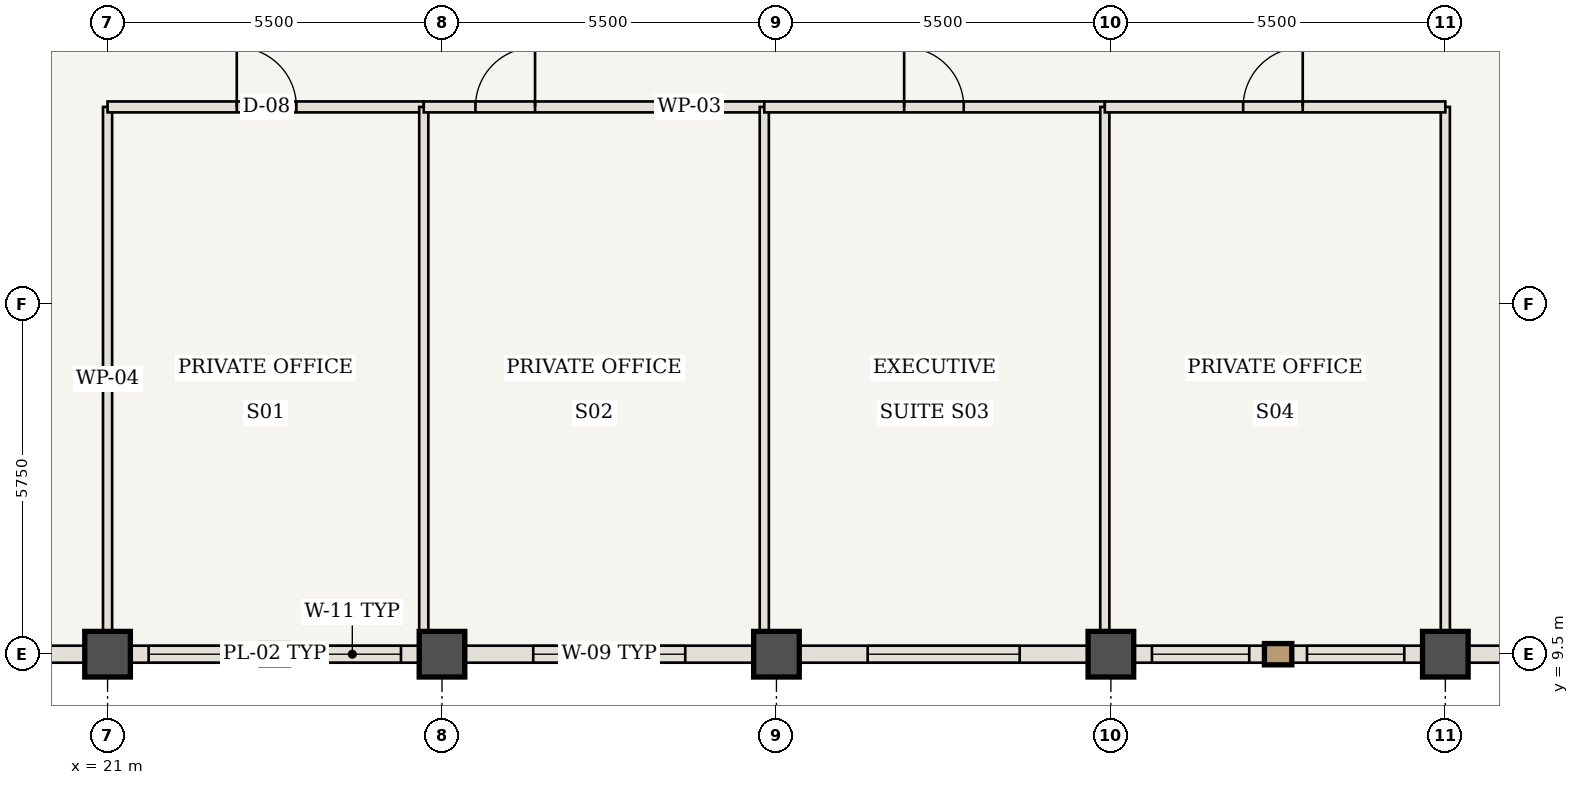
"""IFC4 building model, lengths in metres.
Left out: names, types, materials, properties, quantities, classifications, styles, units other than length and angle.
Written with IfcOpenShell. Run it as: python <this file> out.ifc"""

import sys

from ifc_helpers import new_model, si_unit, direction, frame, frame_2d, origin, origin_2d, place, context, subcontext, project, spatial, rectangle, extrude, element, fill, save


model = new_model("IFC4")
c1 = context("Model", 3, precision=1e-05, world=origin(), true_north=direction((0.0, 1.0)))
c2 = subcontext(c1, "Body", "Model", "MODEL_VIEW")
j1 = project(units=[si_unit("LENGTHUNIT", "METRE"), si_unit("PLANEANGLEUNIT", "RADIAN")], contexts=[c1])
p1 = place(None, origin())
s1 = spatial("IfcSite", under=j1, at=p1, CompositionType="ELEMENT")
p2 = place(p1, origin())
s2 = spatial("IfcBuilding", under=s1, at=p2, CompositionType="ELEMENT")
p3 = place(p2, frame((0.0, 0.0, 269.85)))
s3 = spatial("IfcBuildingStorey", under=s2, at=p3, CompositionType="ELEMENT", Elevation=269.85)
for number, where, z_axis, x_axis in (
    (1, (21.0, 9.5, 0.0), (0.0, 0.0, 1.0), (1.0, 0.0, 0.0)),
    (2, (26.5, 9.5, 0.0), (0.0, 0.0, 1.0), (1.0, 0.0, 0.0)),
    (3, (32.0, 9.5, 0.0), (0.0, 0.0, 1.0), (1.0, 0.0, 0.0)),
    (4, (37.5, 9.5, 0.0), (0.0, 0.0, 1.0), (1.0, 0.0, 0.0)),
    (5, (43.0, 9.5, 0.0), (0.0, 0.0, 1.0), (1.0, 0.0, 0.0)),
):
    element("IfcColumn", number, at=place(p3, frame(where, z_axis=z_axis, x_axis=x_axis)), inside=s3, PredefinedType="COLUMN", context=c2, shape_type="SweptSolid", body=[
        extrude(rectangle(XDim=0.75, YDim=0.75, at=origin_2d()), origin(), (0.0, 0.0, 1.0), 3.85),
    ])
for number, where, z_axis, x_axis in (
    (6, (21.0, 9.56, 0.0), (0.0, 0.0, 1.0), (0.0, 1.0, 0.0)),
    (7, (43.0, 9.56, 0.0), (0.0, 0.0, 1.0), (0.0, 1.0, 0.0)),
):
    element("IfcWall", number, at=place(p3, frame(where, z_axis=z_axis, x_axis=x_axis)), inside=s3, PredefinedType="STANDARD", context=c2, shape_type="SweptSolid", body=[
        extrude(rectangle(XDim=8.94, YDim=0.15, at=frame_2d((4.47, 0.0))), origin(), (0.0, 0.0, 1.0), 3.685),
    ])
p4 = place(p3, frame((21.0, 18.5, 0.0), z_axis=(0.0, 0.0, 1.0), x_axis=(1.0, 0.0, 0.0)))
e8 = element("IfcWall", 8, at=p4, inside=s3, PredefinedType="STANDARD", context=c2, shape_type="SweptSolid", body=[
    extrude(rectangle(XDim=5.2, YDim=0.18, at=frame_2d((2.6, 0.0))), origin(), (0.0, 0.0, 1.0), 3.685),
])
p5 = place(p4, frame((2.125, 0.0, 0.0)))
e9 = element("IfcOpeningElement", 9, at=p5, cuts=e8, PredefinedType="OPENING", context=c2, shape_type="SweptSolid", body=[
    extrude(rectangle(XDim=0.98, YDim=2.2, at=frame_2d((0.49, 1.1))), frame((0.0, 0.1, 0.0), z_axis=(0.0, -1.0, 0.0), x_axis=(1.0, 0.0, 0.0)), (0.0, 0.0, 1.0), 0.2),
])
p6 = place(p3, frame((26.2, 9.56, 0.0), z_axis=(0.0, 0.0, 1.0), x_axis=(0.0, 1.0, 0.0)))
e10 = element("IfcWall", 10, at=p6, inside=s3, PredefinedType="STANDARD", context=c2, shape_type="SweptSolid", body=[
    extrude(rectangle(XDim=8.94, YDim=0.15, at=frame_2d((4.47, 0.0))), origin(), (0.0, 0.0, 1.0), 3.685),
])
p7 = place(p3, frame((26.2, 18.5, 0.0), z_axis=(0.0, 0.0, 1.0), x_axis=(1.0, 0.0, 0.0)))
e11 = element("IfcWall", 11, at=p7, inside=s3, PredefinedType="STANDARD", context=c2, shape_type="SweptSolid", body=[
    extrude(rectangle(XDim=5.6, YDim=0.18, at=frame_2d((2.8, 0.0))), origin(), (0.0, 0.0, 1.0), 3.685),
])
p8 = place(p7, frame((0.85, 0.0, 0.0)))
e12 = element("IfcOpeningElement", 12, at=p8, cuts=e11, PredefinedType="OPENING", context=c2, shape_type="SweptSolid", body=[
    extrude(rectangle(XDim=0.98, YDim=2.2, at=frame_2d((0.49, 1.1))), frame((0.0, 0.1, 0.0), z_axis=(0.0, -1.0, 0.0), x_axis=(1.0, 0.0, 0.0)), (0.0, 0.0, 1.0), 0.2),
])
p9 = place(p3, frame((31.8, 9.56, 0.0), z_axis=(0.0, 0.0, 1.0), x_axis=(0.0, 1.0, 0.0)))
e13 = element("IfcWall", 13, at=p9, inside=s3, PredefinedType="STANDARD", context=c2, shape_type="SweptSolid", body=[
    extrude(rectangle(XDim=8.94, YDim=0.15, at=frame_2d((4.47, 0.0))), origin(), (0.0, 0.0, 1.0), 3.14),
])
p10 = place(p3, frame((31.8, 18.5, 0.0), z_axis=(0.0, 0.0, 1.0), x_axis=(1.0, 0.0, 0.0)))
e14 = element("IfcWall", 14, at=p10, inside=s3, PredefinedType="STANDARD", context=c2, shape_type="SweptSolid", body=[
    extrude(rectangle(XDim=5.6, YDim=0.18, at=frame_2d((2.8, 0.0))), origin(), (0.0, 0.0, 1.0), 3.685),
])
p11 = place(p10, frame((2.3, 0.0, 0.0)))
e15 = element("IfcOpeningElement", 15, at=p11, cuts=e14, PredefinedType="OPENING", context=c2, shape_type="SweptSolid", body=[
    extrude(rectangle(XDim=0.98, YDim=2.2, at=frame_2d((0.49, 1.1))), frame((0.0, 0.1, 0.0), z_axis=(0.0, -1.0, 0.0), x_axis=(1.0, 0.0, 0.0)), (0.0, 0.0, 1.0), 0.2),
])
p12 = place(p3, frame((37.4, 9.56, 0.0), z_axis=(0.0, 0.0, 1.0), x_axis=(0.0, 1.0, 0.0)))
e16 = element("IfcWall", 16, at=p12, inside=s3, PredefinedType="STANDARD", context=c2, shape_type="SweptSolid", body=[
    extrude(rectangle(XDim=8.94, YDim=0.15, at=frame_2d((4.47, 0.0))), origin(), (0.0, 0.0, 1.0), 3.685),
])
p13 = place(p3, frame((37.4, 18.5, 0.0), z_axis=(0.0, 0.0, 1.0), x_axis=(1.0, 0.0, 0.0)))
e17 = element("IfcWall", 17, at=p13, inside=s3, PredefinedType="STANDARD", context=c2, shape_type="SweptSolid", body=[
    extrude(rectangle(XDim=5.6, YDim=0.18, at=frame_2d((2.8, 0.0))), origin(), (0.0, 0.0, 1.0), 3.685),
])
p14 = place(p13, frame((2.275, 0.0, 0.0)))
e18 = element("IfcOpeningElement", 18, at=p14, cuts=e17, PredefinedType="OPENING", context=c2, shape_type="SweptSolid", body=[
    extrude(rectangle(XDim=0.98, YDim=2.2, at=frame_2d((0.49, 1.1))), frame((0.0, 0.1, 0.0), z_axis=(0.0, -1.0, 0.0), x_axis=(1.0, 0.0, 0.0)), (0.0, 0.0, 1.0), 0.2),
])
p15 = place(p3, frame((21.0, 9.5, 0.0), z_axis=(0.0, 0.0, 1.0), x_axis=(-1.0, 0.0, 0.0)))
e19 = element("IfcWall", 19, at=p15, inside=s3, PredefinedType="USERDEFINED", context=c2, shape_type="SweptSolid", body=[
    extrude(rectangle(XDim=5.5, YDim=0.28, at=frame_2d((2.75, 0.0))), origin(), (0.0, 0.0, 1.0), 2.985),
])
p16 = place(p3, frame((26.5, 9.5, 0.0), z_axis=(0.0, 0.0, 1.0), x_axis=(-1.0, 0.0, 0.0)))
e20 = element("IfcWall", 20, at=p16, inside=s3, PredefinedType="USERDEFINED", context=c2, shape_type="SweptSolid", body=[
    extrude(rectangle(XDim=5.5, YDim=0.28, at=frame_2d((2.75, 0.0))), origin(), (0.0, 0.0, 1.0), 2.985),
])
p17 = place(p16, frame((0.675, 0.0, 0.85)))
e21 = element("IfcOpeningElement", 21, at=p17, cuts=e20, PredefinedType="OPENING", context=c2, shape_type="SweptSolid", body=[
    extrude(rectangle(XDim=1.6, YDim=1.935, at=frame_2d((0.8, 0.968))), frame((0.0, 0.15, 0.0), z_axis=(0.0, -1.0, 0.0), x_axis=(1.0, 0.0, 0.0)), (0.0, 0.0, 1.0), 0.3),
])
p18 = place(p16, frame((3.225, 0.0, 0.85)))
e22 = element("IfcOpeningElement", 22, at=p18, cuts=e20, PredefinedType="OPENING", context=c2, shape_type="SweptSolid", body=[
    extrude(rectangle(XDim=1.6, YDim=1.935, at=frame_2d((0.8, 0.968))), frame((0.0, 0.15, 0.0), z_axis=(0.0, -1.0, 0.0), x_axis=(1.0, 0.0, 0.0)), (0.0, 0.0, 1.0), 0.3),
])
p19 = place(p3, frame((32.0, 9.5, 0.0), z_axis=(0.0, 0.0, 1.0), x_axis=(-1.0, 0.0, 0.0)))
e23 = element("IfcWall", 23, at=p19, inside=s3, PredefinedType="USERDEFINED", context=c2, shape_type="SweptSolid", body=[
    extrude(rectangle(XDim=5.5, YDim=0.28, at=frame_2d((2.75, 0.0))), origin(), (0.0, 0.0, 1.0), 2.985),
])
p20 = place(p19, frame((1.5, 0.0, 0.85)))
e24 = element("IfcOpeningElement", 24, at=p20, cuts=e23, PredefinedType="OPENING", context=c2, shape_type="SweptSolid", body=[
    extrude(rectangle(XDim=2.5, YDim=1.935, at=frame_2d((1.25, 0.968))), frame((0.0, 0.15, 0.0), z_axis=(0.0, -1.0, 0.0), x_axis=(1.0, 0.0, 0.0)), (0.0, 0.0, 1.0), 0.3),
])
p21 = place(p3, frame((37.5, 9.5, 0.0), z_axis=(0.0, 0.0, 1.0), x_axis=(-1.0, 0.0, 0.0)))
e25 = element("IfcWall", 25, at=p21, inside=s3, PredefinedType="USERDEFINED", context=c2, shape_type="SweptSolid", body=[
    extrude(rectangle(XDim=5.5, YDim=0.28, at=frame_2d((2.75, 0.0))), origin(), (0.0, 0.0, 1.0), 2.985),
])
p22 = place(p21, frame((1.5, 0.0, 0.85)))
e26 = element("IfcOpeningElement", 26, at=p22, cuts=e25, PredefinedType="OPENING", context=c2, shape_type="SweptSolid", body=[
    extrude(rectangle(XDim=2.5, YDim=1.935, at=frame_2d((1.25, 0.968))), frame((0.0, 0.15, 0.0), z_axis=(0.0, -1.0, 0.0), x_axis=(1.0, 0.0, 0.0)), (0.0, 0.0, 1.0), 0.3),
])
p23 = place(p3, frame((43.0, 9.5, 0.0), z_axis=(0.0, 0.0, 1.0), x_axis=(-1.0, 0.0, 0.0)))
e27 = element("IfcWall", 27, at=p23, inside=s3, PredefinedType="USERDEFINED", context=c2, shape_type="SweptSolid", body=[
    extrude(rectangle(XDim=5.5, YDim=0.28, at=frame_2d((2.75, 0.0))), origin(), (0.0, 0.0, 1.0), 2.985),
])
p24 = place(p23, frame((0.675, 0.0, 0.85)))
e28 = element("IfcOpeningElement", 28, at=p24, cuts=e27, PredefinedType="OPENING", context=c2, shape_type="SweptSolid", body=[
    extrude(rectangle(XDim=1.6, YDim=1.935, at=frame_2d((0.8, 0.968))), frame((0.0, 0.15, 0.0), z_axis=(0.0, -1.0, 0.0), x_axis=(1.0, 0.0, 0.0)), (0.0, 0.0, 1.0), 0.3),
])
p25 = place(p23, frame((3.225, 0.0, 0.85)))
e29 = element("IfcOpeningElement", 29, at=p25, cuts=e27, PredefinedType="OPENING", context=c2, shape_type="SweptSolid", body=[
    extrude(rectangle(XDim=1.6, YDim=1.935, at=frame_2d((0.8, 0.968))), frame((0.0, 0.15, 0.0), z_axis=(0.0, -1.0, 0.0), x_axis=(1.0, 0.0, 0.0)), (0.0, 0.0, 1.0), 0.3),
])
p26 = place(p3, frame((48.5, 9.5, 0.0), z_axis=(0.0, 0.0, 1.0), x_axis=(-1.0, 0.0, 0.0)))
e30 = element("IfcWall", 30, at=p26, inside=s3, PredefinedType="USERDEFINED", context=c2, shape_type="SweptSolid", body=[
    extrude(rectangle(XDim=5.5, YDim=0.28, at=frame_2d((2.75, 0.0))), origin(), (0.0, 0.0, 1.0), 2.985),
])
p27 = place(p5, origin())
e31 = element("IfcDoor", 31, at=p27, inside=s3, OperationType="SINGLE_SWING_LEFT", PredefinedType="DOOR", context=c2, shape_type="SweptSolid", body=[
    extrude(rectangle(XDim=0.98, YDim=2.2, at=frame_2d((0.49, 1.1))), frame((0.0, 0.025, 0.0), z_axis=(0.0, -1.0, 0.0), x_axis=(1.0, 0.0, 0.0)), (0.0, 0.0, 1.0), 0.05),
])
fill(e9, e31)
p28 = place(p8, origin())
e32 = element("IfcDoor", 32, at=p28, inside=s3, OperationType="SINGLE_SWING_RIGHT", PredefinedType="DOOR", context=c2, shape_type="SweptSolid", body=[
    extrude(rectangle(XDim=0.98, YDim=2.2, at=frame_2d((0.49, 1.1))), frame((0.0, 0.025, 0.0), z_axis=(0.0, -1.0, 0.0), x_axis=(1.0, 0.0, 0.0)), (0.0, 0.0, 1.0), 0.05),
])
fill(e12, e32)
p29 = place(p11, origin())
e33 = element("IfcDoor", 33, at=p29, inside=s3, OperationType="SINGLE_SWING_LEFT", PredefinedType="DOOR", context=c2, shape_type="SweptSolid", body=[
    extrude(rectangle(XDim=0.98, YDim=2.2, at=frame_2d((0.49, 1.1))), frame((0.0, 0.025, 0.0), z_axis=(0.0, -1.0, 0.0), x_axis=(1.0, 0.0, 0.0)), (0.0, 0.0, 1.0), 0.05),
])
fill(e15, e33)
p30 = place(p14, origin())
e34 = element("IfcDoor", 34, at=p30, inside=s3, OperationType="SINGLE_SWING_RIGHT", PredefinedType="DOOR", context=c2, shape_type="SweptSolid", body=[
    extrude(rectangle(XDim=0.98, YDim=2.2, at=frame_2d((0.49, 1.1))), frame((0.0, 0.025, 0.0), z_axis=(0.0, -1.0, 0.0), x_axis=(1.0, 0.0, 0.0)), (0.0, 0.0, 1.0), 0.05),
])
fill(e18, e34)
p31 = place(p17, origin())
e35 = element("IfcWindow", 35, at=p31, inside=s3, PartitioningType="SINGLE_PANEL", PredefinedType="WINDOW", context=c2, shape_type="SweptSolid", body=[
    extrude(rectangle(XDim=1.6, YDim=1.935, at=frame_2d((0.8, 0.968))), frame((0.0, 0.03, 0.0), z_axis=(0.0, -1.0, 0.0), x_axis=(1.0, 0.0, 0.0)), (0.0, 0.0, 1.0), 0.06),
])
fill(e21, e35)
p32 = place(p18, origin())
e36 = element("IfcWindow", 36, at=p32, inside=s3, PartitioningType="SINGLE_PANEL", PredefinedType="WINDOW", context=c2, shape_type="SweptSolid", body=[
    extrude(rectangle(XDim=1.6, YDim=1.935, at=frame_2d((0.8, 0.968))), frame((0.0, 0.03, 0.0), z_axis=(0.0, -1.0, 0.0), x_axis=(1.0, 0.0, 0.0)), (0.0, 0.0, 1.0), 0.06),
])
fill(e22, e36)
p33 = place(p20, origin())
e37 = element("IfcWindow", 37, at=p33, inside=s3, PartitioningType="SINGLE_PANEL", PredefinedType="WINDOW", context=c2, shape_type="SweptSolid", body=[
    extrude(rectangle(XDim=2.5, YDim=1.935, at=frame_2d((1.25, 0.968))), frame((0.0, 0.03, 0.0), z_axis=(0.0, -1.0, 0.0), x_axis=(1.0, 0.0, 0.0)), (0.0, 0.0, 1.0), 0.06),
])
fill(e24, e37)
p34 = place(p22, origin())
e38 = element("IfcWindow", 38, at=p34, inside=s3, PartitioningType="SINGLE_PANEL", PredefinedType="WINDOW", context=c2, shape_type="SweptSolid", body=[
    extrude(rectangle(XDim=2.5, YDim=1.935, at=frame_2d((1.25, 0.968))), frame((0.0, 0.03, 0.0), z_axis=(0.0, -1.0, 0.0), x_axis=(1.0, 0.0, 0.0)), (0.0, 0.0, 1.0), 0.06),
])
fill(e26, e38)
p35 = place(p24, origin())
e39 = element("IfcWindow", 39, at=p35, inside=s3, PartitioningType="SINGLE_PANEL", PredefinedType="WINDOW", context=c2, shape_type="SweptSolid", body=[
    extrude(rectangle(XDim=1.6, YDim=1.935, at=frame_2d((0.8, 0.968))), frame((0.0, 0.03, 0.0), z_axis=(0.0, -1.0, 0.0), x_axis=(1.0, 0.0, 0.0)), (0.0, 0.0, 1.0), 0.06),
])
fill(e28, e39)
p36 = place(p25, origin())
e40 = element("IfcWindow", 40, at=p36, inside=s3, PartitioningType="SINGLE_PANEL", PredefinedType="WINDOW", context=c2, shape_type="SweptSolid", body=[
    extrude(rectangle(XDim=1.6, YDim=1.935, at=frame_2d((0.8, 0.968))), frame((0.0, 0.03, 0.0), z_axis=(0.0, -1.0, 0.0), x_axis=(1.0, 0.0, 0.0)), (0.0, 0.0, 1.0), 0.06),
])
fill(e29, e40)
save(model, sys.argv[1])
